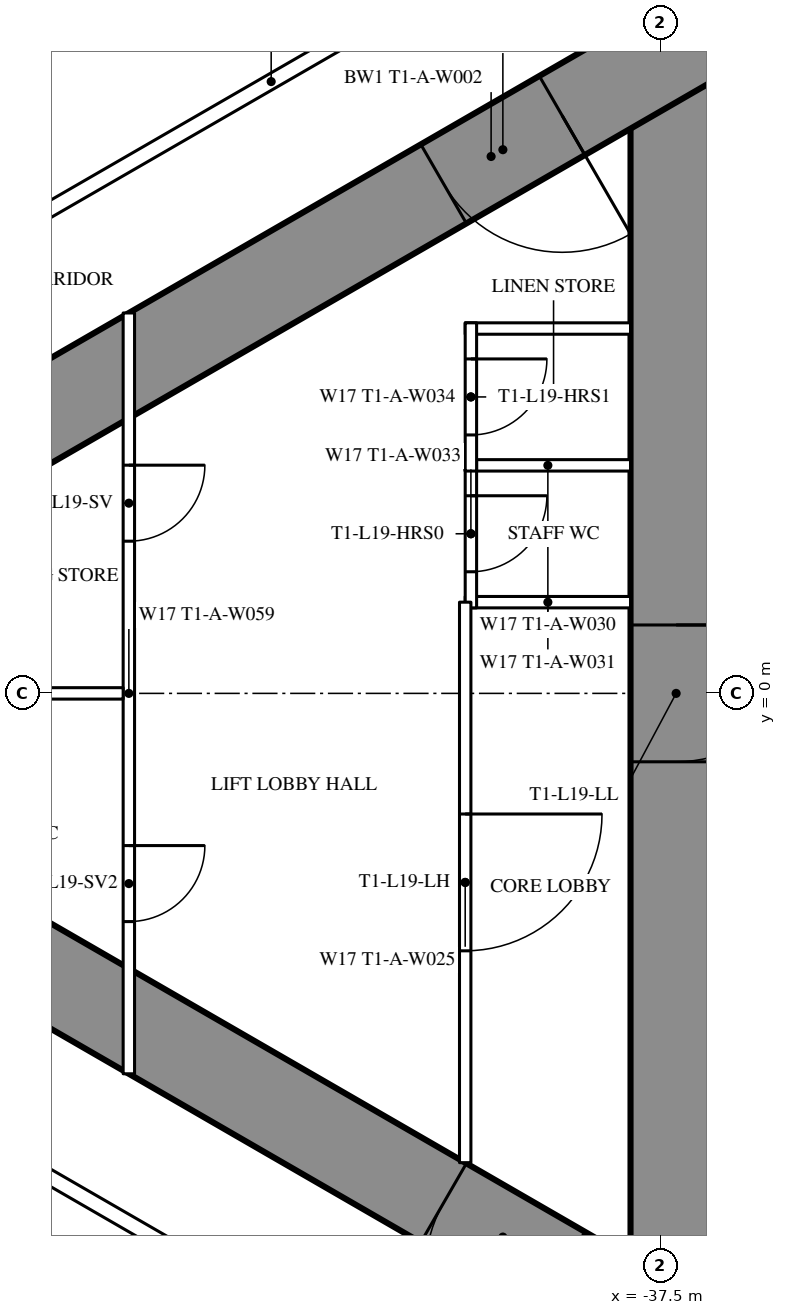
"""IFC4 building model, lengths in metres.
Left out: names, types, materials, properties, quantities, classifications, styles, units other than length and angle.
Written with IfcOpenShell. Run it as: python <this file> out.ifc"""

import sys

from ifc_helpers import new_model, si_unit, direction, frame, frame_2d, origin, place, context, subcontext, project, spatial, rectangle, extrude, element, fill, save


model = new_model("IFC4")
c1 = context("Model", 3, precision=1e-05, world=origin(), true_north=direction((0.0, 1.0)))
c2 = subcontext(c1, "Body", "Model", "MODEL_VIEW")
j1 = project(units=[si_unit("LENGTHUNIT", "METRE"), si_unit("PLANEANGLEUNIT", "RADIAN")], contexts=[c1])
p1 = place(None, origin())
s1 = spatial("IfcSite", under=j1, at=p1, CompositionType="ELEMENT")
p2 = place(p1, origin())
s2 = spatial("IfcBuilding", under=s1, at=p2, CompositionType="ELEMENT")
p3 = place(p2, frame((0.0, 0.0, 74.0)))
s3 = spatial("IfcBuildingStorey", under=s2, at=p3, CompositionType="ELEMENT", Elevation=74.0)
p4 = place(p3, frame((-37.3, 8.6, 0.0), z_axis=(0.0, 0.0, 1.0), x_axis=(0.0, -1.0, 0.0)))
e1 = element("IfcWall", 1, at=p4, inside=s3, PredefinedType="SHEAR", context=c2, shape_type="SweptSolid", body=[
    extrude(rectangle(XDim=17.2, YDim=1.2, at=frame_2d((8.6, 0.0))), origin(), (0.0, 0.0, 1.0), 3.5),
])
p5 = place(p4, frame((7.7, 0.0, 0.0)))
e2 = element("IfcOpeningElement", 2, at=p5, cuts=e1, PredefinedType="OPENING", context=c2, shape_type="SweptSolid", body=[
    extrude(rectangle(XDim=1.8, YDim=2.2, at=frame_2d((0.9, 1.1))), frame((0.0, 0.61, 0.0), z_axis=(0.0, -1.0, 0.0), x_axis=(1.0, 0.0, 0.0)), (0.0, 0.0, 1.0), 1.22),
])
p6 = place(p3, frame((-27.2, 14.3, 0.0), z_axis=(0.0, 0.0, 1.0), x_axis=(-0.866026593062, -0.499997940104, 0.0)))
e3 = element("IfcWall", 3, at=p6, inside=s3, PredefinedType="SHEAR", context=c2, shape_type="SweptSolid", body=[
    extrude(rectangle(XDim=28.946, YDim=1.2, at=frame_2d((14.473, 0.0))), origin(), (0.0, 0.0, 1.0), 3.5),
])
p7 = place(p6, frame((4.6, 0.0, 0.0)))
e4 = element("IfcOpeningElement", 4, at=p7, cuts=e3, PredefinedType="OPENING", context=c2, shape_type="SweptSolid", body=[
    extrude(rectangle(XDim=1.0, YDim=2.2, at=frame_2d((0.5, 1.1))), frame((0.0, 0.61, 0.0), z_axis=(0.0, -1.0, 0.0), x_axis=(1.0, 0.0, 0.0)), (0.0, 0.0, 1.0), 1.22),
])
p8 = place(p6, frame((13.395, 0.0, 0.0)))
e5 = element("IfcOpeningElement", 5, at=p8, cuts=e3, PredefinedType="OPENING", context=c2, shape_type="SweptSolid", body=[
    extrude(rectangle(XDim=1.8, YDim=2.2, at=frame_2d((0.9, 1.1))), frame((0.0, 0.61, 0.0), z_axis=(0.0, -1.0, 0.0), x_axis=(1.0, 0.0, 0.0)), (0.0, 0.0, 1.0), 1.22),
])
p9 = place(p3, frame((-27.2, -14.3, 0.0), z_axis=(0.0, 0.0, 1.0), x_axis=(-0.866024021859, 0.500002393557, 0.0)))
e6 = element("IfcWall", 6, at=p9, inside=s3, PredefinedType="SHEAR", context=c2, shape_type="SweptSolid", body=[
    extrude(rectangle(XDim=27.907, YDim=1.2, at=frame_2d((13.954, 0.0))), origin(), (0.0, 0.0, 1.0), 3.5),
])
p10 = place(p9, frame((4.6, 0.0, 0.0)))
e7 = element("IfcOpeningElement", 7, at=p10, cuts=e6, PredefinedType="OPENING", context=c2, shape_type="SweptSolid", body=[
    extrude(rectangle(XDim=1.0, YDim=2.2, at=frame_2d((0.5, 1.1))), frame((0.0, 0.61, 0.0), z_axis=(0.0, -1.0, 0.0), x_axis=(1.0, 0.0, 0.0)), (0.0, 0.0, 1.0), 1.22),
])
p11 = place(p9, frame((13.395, 0.0, 0.0)))
e8 = element("IfcOpeningElement", 8, at=p11, cuts=e6, PredefinedType="OPENING", context=c2, shape_type="SweptSolid", body=[
    extrude(rectangle(XDim=1.8, YDim=2.2, at=frame_2d((0.9, 1.1))), frame((0.0, 0.61, 0.0), z_axis=(0.0, -1.0, 0.0), x_axis=(1.0, 0.0, 0.0)), (0.0, 0.0, 1.0), 1.22),
])
p12 = place(p3, frame((-36.92, -11.344, 0.0), z_axis=(0.0, 0.0, 1.0), x_axis=(-0.866028313256, 0.499994960614, 0.0)))
e9 = element("IfcWall", 9, at=p12, inside=s3, PredefinedType="PARTITIONING", context=c2, shape_type="SweptSolid", body=[
    extrude(rectangle(XDim=22.568, YDim=0.2, at=frame_2d((11.284, 0.0))), origin(), (0.0, 0.0, 1.0), 3.25),
])
p13 = place(p12, frame((20.958, 0.0, 0.0)))
e10 = element("IfcOpeningElement", 10, at=p13, cuts=e9, PredefinedType="OPENING", context=c2, shape_type="SweptSolid", body=[
    extrude(rectangle(XDim=0.95, YDim=2.2, at=frame_2d((0.475, 1.1))), frame((0.0, 0.11, 0.0), z_axis=(0.0, -1.0, 0.0), x_axis=(1.0, 0.0, 0.0)), (0.0, 0.0, 1.0), 0.22),
])
p14 = place(p12, frame((12.68, 0.0, 0.0)))
e11 = element("IfcOpeningElement", 11, at=p14, cuts=e9, PredefinedType="OPENING", context=c2, shape_type="SweptSolid", body=[
    extrude(rectangle(XDim=0.95, YDim=2.2, at=frame_2d((0.475, 1.1))), frame((0.0, 0.11, 0.0), z_axis=(0.0, -1.0, 0.0), x_axis=(1.0, 0.0, 0.0)), (0.0, 0.0, 1.0), 0.22),
])
p15 = place(p12, frame((3.35, 0.0, 0.0)))
e12 = element("IfcOpeningElement", 12, at=p15, cuts=e9, PredefinedType="OPENING", context=c2, shape_type="SweptSolid", body=[
    extrude(rectangle(XDim=1.0, YDim=2.2, at=frame_2d((0.5, 1.1))), frame((0.0, 0.11, 0.0), z_axis=(0.0, -1.0, 0.0), x_axis=(1.0, 0.0, 0.0)), (0.0, 0.0, 1.0), 0.22),
])
p16 = place(p3, frame((-37.7, 10.894, 0.0), z_axis=(0.0, 0.0, 1.0), x_axis=(-0.866024459167, -0.500001636122, 0.0)))
e13 = element("IfcWall", 13, at=p16, inside=s3, PredefinedType="PARTITIONING", context=c2, shape_type="SweptSolid", body=[
    extrude(rectangle(XDim=11.38, YDim=0.2, at=frame_2d((5.69, 0.0))), origin(), (0.0, 0.0, 1.0), 3.25),
])
p17 = place(p16, frame((0.6, 0.0, 0.0)))
e14 = element("IfcOpeningElement", 14, at=p17, cuts=e13, PredefinedType="OPENING", context=c2, shape_type="SweptSolid", body=[
    extrude(rectangle(XDim=0.95, YDim=2.2, at=frame_2d((0.475, 1.1))), frame((0.0, 0.11, 0.0), z_axis=(0.0, -1.0, 0.0), x_axis=(1.0, 0.0, 0.0)), (0.0, 0.0, 1.0), 0.22),
])
for number, where, z_axis, x_axis in (
    (15, (-37.9, 1.2, 0.0), (0.0, 0.0, 1.0), (-1.0, 0.0, 0.0)),
    (16, (-37.9, 3.0, 0.0), (0.0, 0.0, 1.0), (-1.0, 0.0, 0.0)),
    (17, (-37.9, 4.8, 0.0), (0.0, 0.0, 1.0), (-1.0, 0.0, 0.0)),
):
    element("IfcWall", number, at=place(p3, frame(where, z_axis=z_axis, x_axis=x_axis)), inside=s3, PredefinedType="PARTITIONING", context=c2, shape_type="SweptSolid", body=[
        extrude(rectangle(XDim=2.175, YDim=0.15, at=frame_2d((1.087, 0.0))), origin(), (0.0, 0.0, 1.0), 3.25),
    ])
p18 = place(p3, frame((-40.0, 3.075, 0.0), z_axis=(0.0, 0.0, 1.0), x_axis=(0.0, -1.0, 0.0)))
e18 = element("IfcWall", 18, at=p18, inside=s3, PredefinedType="PARTITIONING", context=c2, shape_type="SweptSolid", body=[
    extrude(rectangle(XDim=1.95, YDim=0.15, at=frame_2d((0.975, 0.0))), origin(), (0.0, 0.0, 1.0), 3.25),
])
p19 = place(p18, frame((0.475, 0.0, 0.0)))
e19 = element("IfcOpeningElement", 19, at=p19, cuts=e18, PredefinedType="OPENING", context=c2, shape_type="SweptSolid", body=[
    extrude(rectangle(XDim=1.0, YDim=2.2, at=frame_2d((0.5, 1.1))), frame((0.0, 0.085, 0.0), z_axis=(0.0, -1.0, 0.0), x_axis=(1.0, 0.0, 0.0)), (0.0, 0.0, 1.0), 0.17),
])
p20 = place(p3, frame((-40.0, 4.875, 0.0), z_axis=(0.0, 0.0, 1.0), x_axis=(0.0, -1.0, 0.0)))
e20 = element("IfcWall", 20, at=p20, inside=s3, PredefinedType="PARTITIONING", context=c2, shape_type="SweptSolid", body=[
    extrude(rectangle(XDim=1.95, YDim=0.15, at=frame_2d((0.975, 0.0))), origin(), (0.0, 0.0, 1.0), 3.25),
])
p21 = place(p20, frame((0.475, 0.0, 0.0)))
e21 = element("IfcOpeningElement", 21, at=p21, cuts=e20, PredefinedType="OPENING", context=c2, shape_type="SweptSolid", body=[
    extrude(rectangle(XDim=1.0, YDim=2.2, at=frame_2d((0.5, 1.1))), frame((0.0, 0.085, 0.0), z_axis=(0.0, -1.0, 0.0), x_axis=(1.0, 0.0, 0.0)), (0.0, 0.0, 1.0), 0.17),
])
p22 = place(p3, frame((-40.075, 1.2, 0.0), z_axis=(0.0, 0.0, 1.0), x_axis=(0.0, -1.0, 0.0)))
e22 = element("IfcWall", 22, at=p22, inside=s3, PredefinedType="PARTITIONING", context=c2, shape_type="SweptSolid", body=[
    extrude(rectangle(XDim=7.374, YDim=0.15, at=frame_2d((3.687, 0.0))), origin(), (0.0, 0.0, 1.0), 3.25),
])
p23 = place(p22, frame((2.787, 0.0, 0.0)))
e23 = element("IfcOpeningElement", 23, at=p23, cuts=e22, PredefinedType="OPENING", context=c2, shape_type="SweptSolid", body=[
    extrude(rectangle(XDim=1.8, YDim=2.2, at=frame_2d((0.9, 1.1))), frame((0.0, 0.085, 0.0), z_axis=(0.0, -1.0, 0.0), x_axis=(1.0, 0.0, 0.0)), (0.0, 0.0, 1.0), 0.17),
])
p24 = place(p3, frame((-44.5, 5.005, 0.0), z_axis=(0.0, 0.0, 1.0), x_axis=(0.0, -1.0, 0.0)))
e24 = element("IfcWall", 24, at=p24, inside=s3, PredefinedType="PARTITIONING", context=c2, shape_type="SweptSolid", body=[
    extrude(rectangle(XDim=10.009, YDim=0.15, at=frame_2d((5.005, 0.0))), origin(), (0.0, 0.0, 1.0), 2.45),
])
p25 = place(p24, frame((2.002, 0.0, 0.0)))
e25 = element("IfcOpeningElement", 25, at=p25, cuts=e24, PredefinedType="OPENING", context=c2, shape_type="SweptSolid", body=[
    extrude(rectangle(XDim=1.0, YDim=2.2, at=frame_2d((0.5, 1.1))), frame((0.0, 0.085, 0.0), z_axis=(0.0, -1.0, 0.0), x_axis=(1.0, 0.0, 0.0)), (0.0, 0.0, 1.0), 0.17),
])
p26 = place(p24, frame((7.007, 0.0, 0.0)))
e26 = element("IfcOpeningElement", 26, at=p26, cuts=e24, PredefinedType="OPENING", context=c2, shape_type="SweptSolid", body=[
    extrude(rectangle(XDim=1.0, YDim=2.2, at=frame_2d((0.5, 1.1))), frame((0.0, 0.085, 0.0), z_axis=(0.0, -1.0, 0.0), x_axis=(1.0, 0.0, 0.0)), (0.0, 0.0, 1.0), 0.17),
])
p27 = place(p3, frame((-44.575, 0.0, 0.0), z_axis=(0.0, 0.0, 1.0), x_axis=(-1.0, 0.0, 0.0)))
e27 = element("IfcWall", 27, at=p27, inside=s3, PredefinedType="PARTITIONING", context=c2, shape_type="SweptSolid", body=[
    extrude(rectangle(XDim=8.593, YDim=0.15, at=frame_2d((4.297, 0.0))), origin(), (0.0, 0.0, 1.0), 2.25),
])
p28 = place(p19, origin())
e28 = element("IfcDoor", 28, at=p28, inside=s3, OperationType="SINGLE_SWING_LEFT", PredefinedType="DOOR", context=c2, shape_type="SweptSolid", body=[
    extrude(rectangle(XDim=1.0, YDim=2.2, at=frame_2d((0.5, 1.1))), frame((0.0, 0.025, 0.0), z_axis=(0.0, -1.0, 0.0), x_axis=(1.0, 0.0, 0.0)), (0.0, 0.0, 1.0), 0.05),
])
fill(e19, e28)
p29 = place(p21, origin())
e29 = element("IfcDoor", 29, at=p29, inside=s3, OperationType="SINGLE_SWING_LEFT", PredefinedType="DOOR", context=c2, shape_type="SweptSolid", body=[
    extrude(rectangle(XDim=1.0, YDim=2.2, at=frame_2d((0.5, 1.1))), frame((0.0, 0.025, 0.0), z_axis=(0.0, -1.0, 0.0), x_axis=(1.0, 0.0, 0.0)), (0.0, 0.0, 1.0), 0.05),
])
fill(e21, e29)
p30 = place(p23, origin())
e30 = element("IfcDoor", 30, at=p30, inside=s3, OperationType="DOUBLE_DOOR_SINGLE_SWING", PredefinedType="DOOR", context=c2, shape_type="SweptSolid", body=[
    extrude(rectangle(XDim=1.8, YDim=2.2, at=frame_2d((0.9, 1.1))), frame((0.0, 0.025, 0.0), z_axis=(0.0, -1.0, 0.0), x_axis=(1.0, 0.0, 0.0)), (0.0, 0.0, 1.0), 0.05),
])
fill(e23, e30)
p31 = place(p25, origin())
e31 = element("IfcDoor", 31, at=p31, inside=s3, OperationType="SINGLE_SWING_LEFT", PredefinedType="DOOR", context=c2, shape_type="SweptSolid", body=[
    extrude(rectangle(XDim=1.0, YDim=2.2, at=frame_2d((0.5, 1.1))), frame((0.0, 0.025, 0.0), z_axis=(0.0, -1.0, 0.0), x_axis=(1.0, 0.0, 0.0)), (0.0, 0.0, 1.0), 0.05),
])
fill(e25, e31)
p32 = place(p26, origin())
e32 = element("IfcDoor", 32, at=p32, inside=s3, OperationType="SINGLE_SWING_LEFT", PredefinedType="DOOR", context=c2, shape_type="SweptSolid", body=[
    extrude(rectangle(XDim=1.0, YDim=2.2, at=frame_2d((0.5, 1.1))), frame((0.0, 0.025, 0.0), z_axis=(0.0, -1.0, 0.0), x_axis=(1.0, 0.0, 0.0)), (0.0, 0.0, 1.0), 0.05),
])
fill(e26, e32)
p33 = place(p8, origin())
e33 = element("IfcDoor", 33, at=p33, inside=s3, OperationType="DOUBLE_DOOR_SINGLE_SWING", PredefinedType="DOOR", context=c2, shape_type="SweptSolid", body=[
    extrude(rectangle(XDim=1.8, YDim=2.2, at=frame_2d((0.9, 1.1))), frame((0.0, 0.025, 0.0), z_axis=(0.0, -1.0, 0.0), x_axis=(1.0, 0.0, 0.0)), (0.0, 0.0, 1.0), 0.05),
])
fill(e5, e33)
p34 = place(p11, origin())
e34 = element("IfcDoor", 34, at=p34, inside=s3, OperationType="DOUBLE_DOOR_SINGLE_SWING", PredefinedType="DOOR", context=c2, shape_type="SweptSolid", body=[
    extrude(rectangle(XDim=1.8, YDim=2.2, at=frame_2d((0.9, 1.1))), frame((0.0, 0.025, 0.0), z_axis=(0.0, -1.0, 0.0), x_axis=(1.0, 0.0, 0.0)), (0.0, 0.0, 1.0), 0.05),
])
fill(e8, e34)
p35 = place(p5, origin())
e35 = element("IfcDoor", 35, at=p35, inside=s3, OperationType="DOUBLE_DOOR_SINGLE_SWING", PredefinedType="DOOR", context=c2, shape_type="SweptSolid", body=[
    extrude(rectangle(XDim=1.8, YDim=2.2, at=frame_2d((0.9, 1.1))), frame((0.0, 0.025, 0.0), z_axis=(0.0, -1.0, 0.0), x_axis=(1.0, 0.0, 0.0)), (0.0, 0.0, 1.0), 0.05),
])
fill(e2, e35)
save(model, sys.argv[1])
